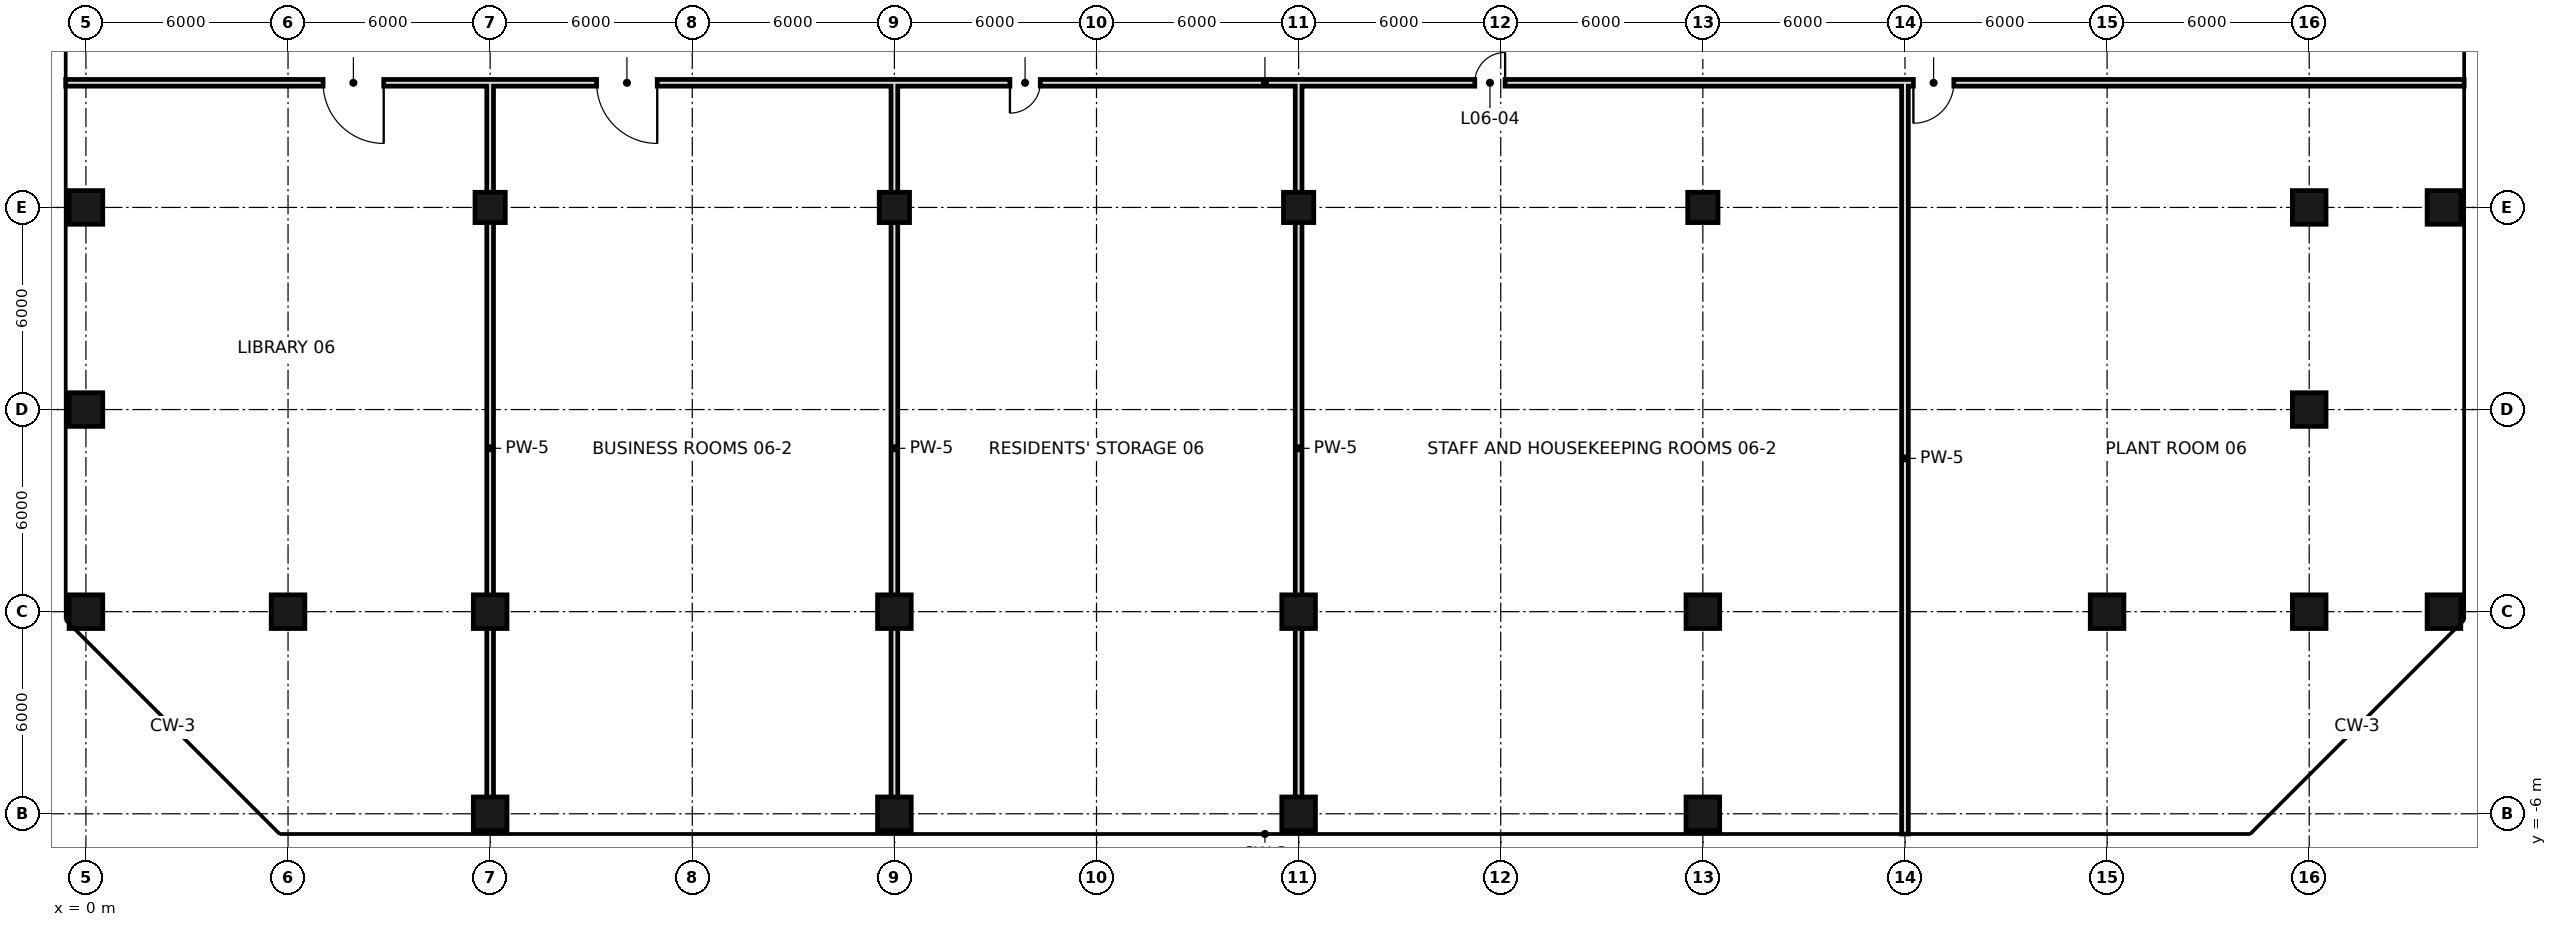
"""IFC4 building model, lengths in metres.
Left out: names, types, materials, properties, quantities, classifications, styles, units other than length and angle.
Written with IfcOpenShell. Run it as: python <this file> out.ifc"""

import sys

from ifc_helpers import new_model, si_unit, direction, frame, frame_2d, origin, origin_2d, place, context, subcontext, project, spatial, rectangle, hollow_rectangle, extrude, element, fill, save


model = new_model("IFC4")
c1 = context("Model", 3, precision=1e-05, world=origin(), true_north=direction((0.0, 1.0)))
c2 = subcontext(c1, "Body", "Model", "MODEL_VIEW")
j1 = project(units=[si_unit("LENGTHUNIT", "METRE"), si_unit("PLANEANGLEUNIT", "RADIAN")], contexts=[c1])
p1 = place(None, origin())
s1 = spatial("IfcSite", under=j1, at=p1, CompositionType="ELEMENT")
p2 = place(p1, origin())
s2 = spatial("IfcBuilding", under=s1, at=p2, CompositionType="ELEMENT")
p3 = place(p2, frame((0.0, 0.0, 39.6)))
s3 = spatial("IfcBuildingStorey", under=s2, at=p3, CompositionType="ELEMENT", Elevation=39.6)
for number, where, z_axis, x_axis in (
    (1, (0.0, 0.0, 0.0), (0.0, 0.0, 1.0), (1.0, 0.0, 0.0)),
    (2, (0.0, 6.0, 0.0), (0.0, 0.0, 1.0), (1.0, 0.0, 0.0)),
    (3, (0.0, 12.0, 0.0), (0.0, 0.0, 1.0), (1.0, 0.0, 0.0)),
    (4, (6.0, 0.0, 0.0), (0.0, 0.0, 1.0), (1.0, 0.0, 0.0)),
    (5, (12.0, -6.0, 0.0), (0.0, 0.0, 1.0), (1.0, 0.0, 0.0)),
    (6, (12.0, 0.0, 0.0), (0.0, 0.0, 1.0), (1.0, 0.0, 0.0)),
):
    element("IfcColumn", number, at=place(p3, frame(where, z_axis=z_axis, x_axis=x_axis)), inside=s3, PredefinedType="COLUMN", context=c2, shape_type="SweptSolid", body=[
        extrude(hollow_rectangle(XDim=1.0, YDim=1.0, WallThickness=0.05, at=origin_2d()), origin(), (0.0, 0.0, 1.0), 4.8),
    ])
p4 = place(p3, frame((12.0, 12.0, 0.0), z_axis=(0.0, 0.0, 1.0), x_axis=(1.0, 0.0, 0.0)))
e7 = element("IfcColumn", 7, at=p4, inside=s3, PredefinedType="COLUMN", context=c2, shape_type="SweptSolid", body=[
    extrude(hollow_rectangle(XDim=0.9, YDim=0.9, WallThickness=0.045, at=origin_2d()), origin(), (0.0, 0.0, 1.0), 4.8),
])
for number, where, z_axis, x_axis in (
    (8, (24.0, -6.0, 0.0), (0.0, 0.0, 1.0), (1.0, 0.0, 0.0)),
    (9, (24.0, 0.0, 0.0), (0.0, 0.0, 1.0), (1.0, 0.0, 0.0)),
):
    element("IfcColumn", number, at=place(p3, frame(where, z_axis=z_axis, x_axis=x_axis)), inside=s3, PredefinedType="COLUMN", context=c2, shape_type="SweptSolid", body=[
        extrude(hollow_rectangle(XDim=1.0, YDim=1.0, WallThickness=0.05, at=origin_2d()), origin(), (0.0, 0.0, 1.0), 4.8),
    ])
p5 = place(p3, frame((24.0, 12.0, 0.0), z_axis=(0.0, 0.0, 1.0), x_axis=(1.0, 0.0, 0.0)))
e10 = element("IfcColumn", 10, at=p5, inside=s3, PredefinedType="COLUMN", context=c2, shape_type="SweptSolid", body=[
    extrude(hollow_rectangle(XDim=0.9, YDim=0.9, WallThickness=0.045, at=origin_2d()), origin(), (0.0, 0.0, 1.0), 4.8),
])
for number, where, z_axis, x_axis in (
    (11, (36.0, -6.0, 0.0), (0.0, 0.0, 1.0), (1.0, 0.0, 0.0)),
    (12, (36.0, 0.0, 0.0), (0.0, 0.0, 1.0), (1.0, 0.0, 0.0)),
):
    element("IfcColumn", number, at=place(p3, frame(where, z_axis=z_axis, x_axis=x_axis)), inside=s3, PredefinedType="COLUMN", context=c2, shape_type="SweptSolid", body=[
        extrude(hollow_rectangle(XDim=1.0, YDim=1.0, WallThickness=0.05, at=origin_2d()), origin(), (0.0, 0.0, 1.0), 4.8),
    ])
p6 = place(p3, frame((36.0, 12.0, 0.0), z_axis=(0.0, 0.0, 1.0), x_axis=(1.0, 0.0, 0.0)))
e13 = element("IfcColumn", 13, at=p6, inside=s3, PredefinedType="COLUMN", context=c2, shape_type="SweptSolid", body=[
    extrude(hollow_rectangle(XDim=0.9, YDim=0.9, WallThickness=0.045, at=origin_2d()), origin(), (0.0, 0.0, 1.0), 4.8),
])
for number, where, z_axis, x_axis in (
    (14, (48.0, -6.0, 0.0), (0.0, 0.0, 1.0), (1.0, 0.0, 0.0)),
    (15, (48.0, 0.0, 0.0), (0.0, 0.0, 1.0), (1.0, 0.0, 0.0)),
):
    element("IfcColumn", number, at=place(p3, frame(where, z_axis=z_axis, x_axis=x_axis)), inside=s3, PredefinedType="COLUMN", context=c2, shape_type="SweptSolid", body=[
        extrude(hollow_rectangle(XDim=1.0, YDim=1.0, WallThickness=0.05, at=origin_2d()), origin(), (0.0, 0.0, 1.0), 4.8),
    ])
p7 = place(p3, frame((48.0, 12.0, 0.0), z_axis=(0.0, 0.0, 1.0), x_axis=(1.0, 0.0, 0.0)))
e16 = element("IfcColumn", 16, at=p7, inside=s3, PredefinedType="COLUMN", context=c2, shape_type="SweptSolid", body=[
    extrude(hollow_rectangle(XDim=0.9, YDim=0.9, WallThickness=0.045, at=origin_2d()), origin(), (0.0, 0.0, 1.0), 4.8),
])
for number, where, z_axis, x_axis in (
    (17, (60.0, 0.0, 0.0), (0.0, 0.0, 1.0), (1.0, 0.0, 0.0)),
    (18, (66.0, 0.0, 0.0), (0.0, 0.0, 1.0), (1.0, 0.0, 0.0)),
    (19, (66.0, 6.0, 0.0), (0.0, 0.0, 1.0), (1.0, 0.0, 0.0)),
    (20, (66.0, 12.0, 0.0), (0.0, 0.0, 1.0), (1.0, 0.0, 0.0)),
    (21, (70.0, 0.0, 0.0), (0.0, 0.0, 1.0), (1.0, 0.0, 0.0)),
    (22, (70.0, 12.0, 0.0), (0.0, 0.0, 1.0), (1.0, 0.0, 0.0)),
):
    element("IfcColumn", number, at=place(p3, frame(where, z_axis=z_axis, x_axis=x_axis)), inside=s3, PredefinedType="COLUMN", context=c2, shape_type="SweptSolid", body=[
        extrude(hollow_rectangle(XDim=1.0, YDim=1.0, WallThickness=0.05, at=origin_2d()), origin(), (0.0, 0.0, 1.0), 4.8),
    ])
for number, where, z_axis, x_axis in (
    (23, (12.0, -6.0, 0.0), (0.0, 0.0, 1.0), (0.0, 1.0, 0.0)),
    (24, (24.0, -6.0, 0.0), (0.0, 0.0, 1.0), (0.0, 1.0, 0.0)),
    (25, (36.0, -6.0, 0.0), (0.0, 0.0, 1.0), (0.0, 1.0, 0.0)),
):
    element("IfcWall", number, at=place(p3, frame(where, z_axis=z_axis, x_axis=x_axis)), inside=s3, PredefinedType="SOLIDWALL", context=c2, shape_type="SweptSolid", body=[
        extrude(rectangle(XDim=21.7, YDim=0.2, at=frame_2d((10.85, 0.0))), origin(), (0.0, 0.0, 1.0), 3.8),
    ])
p8 = place(p3, frame((54.0, -6.6, 0.0), z_axis=(0.0, 0.0, 1.0), x_axis=(0.0, 1.0, 0.0)))
e26 = element("IfcWall", 26, at=p8, inside=s3, PredefinedType="SOLIDWALL", context=c2, shape_type="SweptSolid", body=[
    extrude(rectangle(XDim=22.3, YDim=0.2, at=frame_2d((11.15, 0.0))), origin(), (0.0, 0.0, 1.0), 3.6),
])
p9 = place(p3, frame((-0.6, 15.7, 0.0), z_axis=(0.0, 0.0, 1.0), x_axis=(1.0, 0.0, 0.0)))
e27 = element("IfcWall", 27, at=p9, inside=s3, PredefinedType="SOLIDWALL", context=c2, shape_type="SweptSolid", body=[
    extrude(rectangle(XDim=71.2, YDim=0.2, at=frame_2d((35.6, 0.0))), origin(), (0.0, 0.0, 1.0), 3.8),
])
p10 = place(p9, frame((7.64, 0.0, 0.0)))
e28 = element("IfcOpeningElement", 28, at=p10, cuts=e27, PredefinedType="OPENING", context=c2, shape_type="SweptSolid", body=[
    extrude(rectangle(XDim=1.8, YDim=2.4, at=frame_2d((0.9, 1.2))), frame((0.0, 0.11, 0.0), z_axis=(0.0, -1.0, 0.0), x_axis=(1.0, 0.0, 0.0)), (0.0, 0.0, 1.0), 0.22),
])
p11 = place(p9, frame((15.76, 0.0, 0.0)))
e29 = element("IfcOpeningElement", 29, at=p11, cuts=e27, PredefinedType="OPENING", context=c2, shape_type="SweptSolid", body=[
    extrude(rectangle(XDim=1.8, YDim=2.4, at=frame_2d((0.9, 1.2))), frame((0.0, 0.11, 0.0), z_axis=(0.0, -1.0, 0.0), x_axis=(1.0, 0.0, 0.0)), (0.0, 0.0, 1.0), 0.22),
])
p12 = place(p9, frame((28.03, 0.0, 0.0)))
e30 = element("IfcOpeningElement", 30, at=p12, cuts=e27, PredefinedType="OPENING", context=c2, shape_type="SweptSolid", body=[
    extrude(rectangle(XDim=0.9, YDim=2.1, at=frame_2d((0.45, 1.05))), frame((0.0, 0.11, 0.0), z_axis=(0.0, -1.0, 0.0), x_axis=(1.0, 0.0, 0.0)), (0.0, 0.0, 1.0), 0.22),
])
p13 = place(p9, frame((41.83, 0.0, 0.0)))
e31 = element("IfcOpeningElement", 31, at=p13, cuts=e27, PredefinedType="OPENING", context=c2, shape_type="SweptSolid", body=[
    extrude(rectangle(XDim=0.9, YDim=2.1, at=frame_2d((0.45, 1.05))), frame((0.0, 0.11, 0.0), z_axis=(0.0, -1.0, 0.0), x_axis=(1.0, 0.0, 0.0)), (0.0, 0.0, 1.0), 0.22),
])
p14 = place(p9, frame((54.85, 0.0, 0.0)))
e32 = element("IfcOpeningElement", 32, at=p14, cuts=e27, PredefinedType="OPENING", context=c2, shape_type="SweptSolid", body=[
    extrude(rectangle(XDim=1.2, YDim=2.4, at=frame_2d((0.6, 1.2))), frame((0.0, 0.11, 0.0), z_axis=(0.0, -1.0, 0.0), x_axis=(1.0, 0.0, 0.0)), (0.0, 0.0, 1.0), 0.22),
])
p15 = place(p10, origin())
e33 = element("IfcDoor", 33, at=p15, inside=s3, OperationType="SINGLE_SWING_RIGHT", PredefinedType="DOOR", context=c2, shape_type="SweptSolid", body=[
    extrude(rectangle(XDim=1.8, YDim=2.4, at=frame_2d((0.9, 1.2))), frame((0.0, 0.025, 0.0), z_axis=(0.0, -1.0, 0.0), x_axis=(1.0, 0.0, 0.0)), (0.0, 0.0, 1.0), 0.05),
])
fill(e28, e33)
p16 = place(p11, origin())
e34 = element("IfcDoor", 34, at=p16, inside=s3, OperationType="SINGLE_SWING_RIGHT", PredefinedType="DOOR", context=c2, shape_type="SweptSolid", body=[
    extrude(rectangle(XDim=1.8, YDim=2.4, at=frame_2d((0.9, 1.2))), frame((0.0, 0.025, 0.0), z_axis=(0.0, -1.0, 0.0), x_axis=(1.0, 0.0, 0.0)), (0.0, 0.0, 1.0), 0.05),
])
fill(e29, e34)
p17 = place(p12, frame((0.9, 0.0, 0.0), z_axis=(0.0, 0.0, 1.0), x_axis=(-1.0, 0.0, 0.0)))
e35 = element("IfcDoor", 35, at=p17, inside=s3, OperationType="SINGLE_SWING_RIGHT", PredefinedType="DOOR", context=c2, shape_type="SweptSolid", body=[
    extrude(rectangle(XDim=0.9, YDim=2.1, at=frame_2d((0.45, 1.05))), frame((0.0, 0.025, 0.0), z_axis=(0.0, -1.0, 0.0), x_axis=(1.0, 0.0, 0.0)), (0.0, 0.0, 1.0), 0.05),
])
fill(e30, e35)
p18 = place(p13, frame((0.9, 0.0, 0.0), z_axis=(0.0, 0.0, 1.0), x_axis=(-1.0, 0.0, 0.0)))
e36 = element("IfcDoor", 36, at=p18, inside=s3, OperationType="SINGLE_SWING_LEFT", PredefinedType="DOOR", context=c2, shape_type="SweptSolid", body=[
    extrude(rectangle(XDim=0.9, YDim=2.1, at=frame_2d((0.45, 1.05))), frame((0.0, 0.025, 0.0), z_axis=(0.0, -1.0, 0.0), x_axis=(1.0, 0.0, 0.0)), (0.0, 0.0, 1.0), 0.05),
])
fill(e31, e36)
p19 = place(p14, frame((1.2, 0.0, 0.0), z_axis=(0.0, 0.0, 1.0), x_axis=(-1.0, 0.0, 0.0)))
e37 = element("IfcDoor", 37, at=p19, inside=s3, OperationType="SINGLE_SWING_RIGHT", PredefinedType="DOOR", context=c2, shape_type="SweptSolid", body=[
    extrude(rectangle(XDim=1.2, YDim=2.4, at=frame_2d((0.6, 1.2))), frame((0.0, 0.025, 0.0), z_axis=(0.0, -1.0, 0.0), x_axis=(1.0, 0.0, 0.0)), (0.0, 0.0, 1.0), 0.05),
])
fill(e32, e37)
save(model, sys.argv[1])
